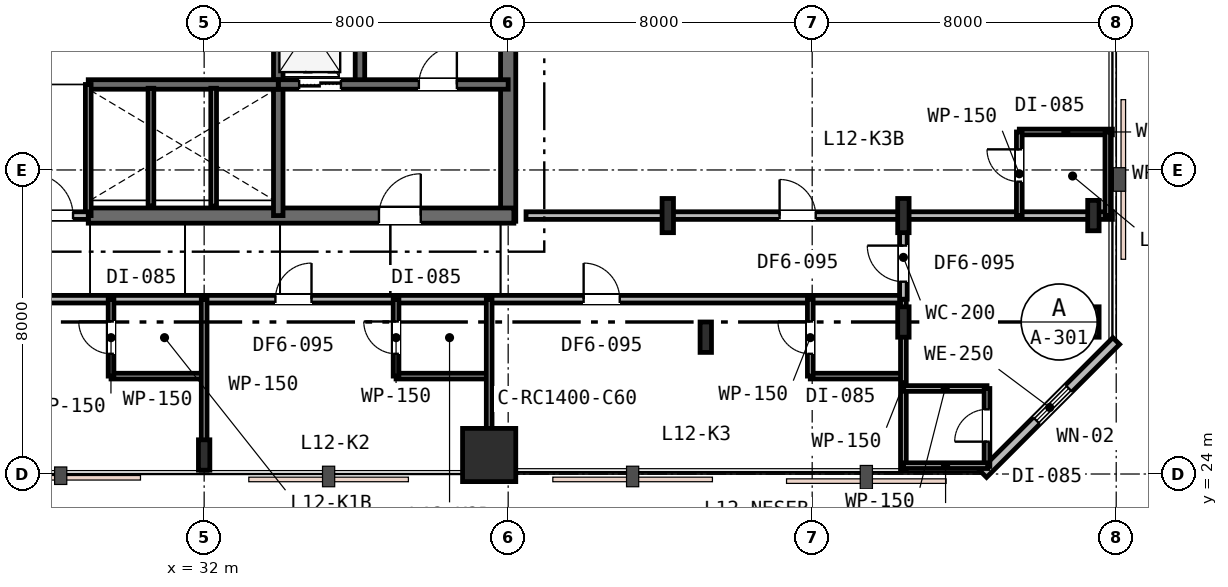
"""IFC4 building model, lengths in metres.
Left out: names, types, materials, properties, quantities, classifications, styles, units other than length and angle.
Written with IfcOpenShell. Run it as: python <this file> out.ifc"""

import sys

from ifc_helpers import new_model, si_unit, direction, frame, frame_2d, origin, origin_2d, place, context, subcontext, project, spatial, rectangle, i_section, extrude, element, fill, save


model = new_model("IFC4")
c1 = context("Model", 3, precision=1e-05, world=origin(), true_north=direction((0.0, 1.0)))
c2 = subcontext(c1, "Body", "Model", "MODEL_VIEW")
j1 = project(units=[si_unit("LENGTHUNIT", "METRE"), si_unit("PLANEANGLEUNIT", "RADIAN")], contexts=[c1])
p1 = place(None, origin())
s1 = spatial("IfcSite", under=j1, at=p1, CompositionType="ELEMENT")
p2 = place(p1, origin())
s2 = spatial("IfcBuilding", under=s1, at=p2, CompositionType="ELEMENT")
p3 = place(p2, frame((0.0, 0.0, 51.0)))
s3 = spatial("IfcBuildingStorey", under=s2, at=p3, CompositionType="ELEMENT", Elevation=51.0)
p4 = place(p3, frame((40.0, 30.65, 0.0), z_axis=(0.0, 0.0, 1.0), x_axis=(0.0, 1.0, 0.0)))
e1 = element("IfcWall", 1, at=p4, inside=s3, PredefinedType="SHEAR", context=c2, shape_type="SweptSolid", body=[
    extrude(rectangle(XDim=12.3, YDim=0.4, at=frame_2d((6.15, 0.0))), origin(), (0.0, 0.0, 1.0), 3.6),
])
p5 = place(p3, frame((28.95, 30.8, 0.0), z_axis=(0.0, 0.0, 1.0), x_axis=(1.0, 0.0, 0.0)))
e2 = element("IfcWall", 2, at=p5, inside=s3, PredefinedType="SHEAR", context=c2, shape_type="SweptSolid", body=[
    extrude(rectangle(XDim=11.2, YDim=0.4, at=frame_2d((5.6, 0.0))), origin(), (0.0, 0.0, 1.0), 3.6),
])
p6 = place(p5, frame((7.65, 0.0, 0.0)))
e3 = element("IfcOpeningElement", 3, at=p6, cuts=e2, PredefinedType="OPENING", context=c2, shape_type="SweptSolid", body=[
    extrude(rectangle(XDim=1.1, YDim=2.15, at=frame_2d((0.55, 1.075))), frame((0.0, 0.21, 0.0), z_axis=(0.0, -1.0, 0.0), x_axis=(1.0, 0.0, 0.0)), (0.0, 0.0, 1.0), 0.42),
])
p7 = place(p3, frame((36.1, 34.25, 0.0), z_axis=(0.0, 0.0, 1.0), x_axis=(0.0, 1.0, 0.0)))
e4 = element("IfcWall", 4, at=p7, inside=s3, PredefinedType="SHEAR", context=c2, shape_type="SweptSolid", body=[
    extrude(rectangle(XDim=8.65, YDim=0.25, at=frame_2d((4.325, 0.0))), origin(), (0.0, 0.0, 1.0), 3.6),
])
p8 = place(p3, frame((33.95, 30.8, 0.0), z_axis=(0.0, 0.0, 1.0), x_axis=(0.0, 1.0, 0.0)))
e5 = element("IfcWall", 5, at=p8, inside=s3, PredefinedType="SHEAR", context=c2, shape_type="SweptSolid", body=[
    extrude(rectangle(XDim=6.45, YDim=0.25, at=frame_2d((3.225, 0.0))), origin(), (0.0, 0.0, 1.0), 3.6),
])
p9 = place(p3, frame((33.95, 34.25, 0.0), z_axis=(0.0, 0.0, 1.0), x_axis=(1.0, 0.0, 0.0)))
e6 = element("IfcWall", 6, at=p9, inside=s3, PredefinedType="SHEAR", context=c2, shape_type="SweptSolid", body=[
    extrude(rectangle(XDim=6.05, YDim=0.25, at=frame_2d((3.025, 0.0))), origin(), (0.0, 0.0, 1.0), 3.6),
])
p10 = place(p9, frame((3.7, 0.0, 0.0)))
e7 = element("IfcOpeningElement", 7, at=p10, cuts=e6, PredefinedType="OPENING", context=c2, shape_type="SweptSolid", body=[
    extrude(rectangle(XDim=1.0, YDim=2.15, at=frame_2d((0.5, 1.075))), frame((0.0, 0.135, 0.0), z_axis=(0.0, -1.0, 0.0), x_axis=(1.0, 0.0, 0.0)), (0.0, 0.0, 1.0), 0.27),
])
p11 = place(p9, frame((0.55, 0.0, 0.0)))
e8 = element("IfcOpeningElement", 8, at=p11, cuts=e6, PredefinedType="OPENING", context=c2, shape_type="SweptSolid", body=[
    extrude(rectangle(XDim=1.1, YDim=2.15, at=frame_2d((0.55, 1.075))), frame((0.0, 0.135, 0.0), z_axis=(0.0, -1.0, 0.0), x_axis=(1.0, 0.0, 0.0)), (0.0, 0.0, 1.0), 0.27),
])
p12 = place(p3, frame((28.95, 34.25, 0.0), z_axis=(0.0, 0.0, 1.0), x_axis=(1.0, 0.0, 0.0)))
e9 = element("IfcWall", 9, at=p12, inside=s3, PredefinedType="SHEAR", context=c2, shape_type="SweptSolid", body=[
    extrude(rectangle(XDim=5.0, YDim=0.25, at=frame_2d((2.5, 0.0))), origin(), (0.0, 0.0, 1.0), 3.6),
])
p13 = place(p3, frame((32.0, 24.5, 0.0), z_axis=(0.0, 0.0, 1.0), x_axis=(1.0, 0.0, 0.0)))
e10 = element("IfcColumn", 10, at=p13, inside=s3, PredefinedType="COLUMN", context=c2, shape_type="SweptSolid", body=[
    extrude(i_section(OverallWidth=0.3, OverallDepth=0.8, WebThickness=0.018, FlangeThickness=0.033, FilletRadius=0.03, at=origin_2d()), origin(), (0.0, 0.0, 1.0), 3.6),
])
p14 = place(p3, frame((39.5, 24.5, 0.0), z_axis=(0.0, 0.0, 1.0), x_axis=(1.0, 0.0, 0.0)))
e11 = element("IfcColumn", 11, at=p14, inside=s3, PredefinedType="COLUMN", context=c2, shape_type="SweptSolid", body=[
    extrude(rectangle(XDim=1.4, YDim=1.4, at=origin_2d()), origin(), (0.0, 0.0, 1.0), 3.6),
])
for number, where, z_axis, x_axis in (
    (12, (45.2, 27.6, 0.0), (0.0, 0.0, 1.0), (1.0, 0.0, 0.0)),
    (13, (50.4, 28.0, 0.0), (0.0, 0.0, 1.0), (1.0, 0.0, 0.0)),
    (14, (55.4, 28.0, 0.0), (0.0, 0.0, 1.0), (1.0, 0.0, 0.0)),
    (15, (55.4, 30.8, 0.0), (0.0, 0.0, 1.0), (1.0, 0.0, 0.0)),
):
    element("IfcColumn", number, at=place(p3, frame(where, z_axis=z_axis, x_axis=x_axis)), inside=s3, PredefinedType="COLUMN", context=c2, shape_type="SweptSolid", body=[
        extrude(i_section(OverallWidth=0.3, OverallDepth=0.8, WebThickness=0.018, FlangeThickness=0.033, FilletRadius=0.03, at=origin_2d()), origin(), (0.0, 0.0, 1.0), 3.6),
    ])
for number, where, z_axis, x_axis in (
    (16, (44.2, 30.8, 0.0), (0.0, 0.0, 1.0), (1.0, 0.0, 0.0)),
    (17, (50.4, 30.8, 0.0), (0.0, 0.0, 1.0), (1.0, 0.0, 0.0)),
):
    element("IfcColumn", number, at=place(p3, frame(where, z_axis=z_axis, x_axis=x_axis)), inside=s3, PredefinedType="COLUMN", context=c2, shape_type="SweptSolid", body=[
        extrude(i_section(OverallWidth=0.3, OverallDepth=0.9, WebThickness=0.018, FlangeThickness=0.035, FilletRadius=0.03, at=origin_2d()), origin(), (0.0, 0.0, 1.0), 3.6),
    ])
p15 = place(p3, frame((52.5, 24.0, 0.0), z_axis=(0.0, 0.0, 1.0), x_axis=(0.707106781187, 0.707106781187, 0.0)))
e18 = element("IfcWall", 18, at=p15, inside=s3, PredefinedType="STANDARD", context=c2, shape_type="SweptSolid", body=[
    extrude(rectangle(XDim=4.95, YDim=0.25, at=frame_2d((2.475, 0.0))), origin(), (0.0, 0.0, 1.0), 3.33),
])
p16 = place(p15, frame((1.985, 0.0, 0.85)))
e19 = element("IfcOpeningElement", 19, at=p16, cuts=e18, PredefinedType="OPENING", context=c2, shape_type="SweptSolid", body=[
    extrude(rectangle(XDim=1.2, YDim=1.6, at=frame_2d((0.6, 0.8))), frame((0.0, 0.135, 0.0), z_axis=(0.0, -1.0, 0.0), x_axis=(1.0, 0.0, 0.0)), (0.0, 0.0, 1.0), 0.27),
])
p17 = place(p3, frame((28.95, 30.8, 0.0), z_axis=(0.0, 0.0, 1.0), x_axis=(0.0, 1.0, 0.0)))
e20 = element("IfcWall", 20, at=p17, inside=s3, PredefinedType="PLUMBINGWALL", context=c2, shape_type="SweptSolid", body=[
    extrude(rectangle(XDim=3.45, YDim=0.15, at=frame_2d((1.725, 0.0))), origin(), (0.0, 0.0, 1.0), 3.33),
])
p18 = place(p3, frame((27.05, 30.8, 0.0), z_axis=(0.0, 0.0, 1.0), x_axis=(1.0, 0.0, 0.0)))
e21 = element("IfcWall", 21, at=p18, inside=s3, PredefinedType="PARTITIONING", context=c2, shape_type="SweptSolid", body=[
    extrude(rectangle(XDim=1.9, YDim=0.2, at=frame_2d((0.95, 0.0))), origin(), (0.0, 0.0, 1.0), 3.33),
])
p19 = place(p18, frame((0.4, 0.0, 0.0)))
e22 = element("IfcOpeningElement", 22, at=p19, cuts=e21, PredefinedType="OPENING", context=c2, shape_type="SweptSolid", body=[
    extrude(rectangle(XDim=1.1, YDim=2.15, at=frame_2d((0.55, 1.075))), frame((0.0, 0.11, 0.0), z_axis=(0.0, -1.0, 0.0), x_axis=(1.0, 0.0, 0.0)), (0.0, 0.0, 1.0), 0.22),
])
for number, where, z_axis, x_axis in (
    (23, (30.6, 31.05, 0.0), (0.0, 0.0, 1.0), (0.0, 1.0, 0.0)),
    (24, (32.25, 31.05, 0.0), (0.0, 0.0, 1.0), (0.0, 1.0, 0.0)),
):
    element("IfcWall", number, at=place(p3, frame(where, z_axis=z_axis, x_axis=x_axis)), inside=s3, PredefinedType="PLUMBINGWALL", context=c2, shape_type="SweptSolid", body=[
        extrude(rectangle(XDim=3.1, YDim=0.15, at=frame_2d((1.55, 0.0))), origin(), (0.0, 0.0, 1.0), 3.33),
    ])
p20 = place(p3, frame((21.8, 28.6, 0.0), z_axis=(0.0, 0.0, 1.0), x_axis=(1.0, 0.0, 0.0)))
e25 = element("IfcWall", 25, at=p20, inside=s3, PredefinedType="PARTITIONING", context=c2, shape_type="SweptSolid", body=[
    extrude(rectangle(XDim=28.6, YDim=0.2, at=frame_2d((14.3, 0.0))), origin(), (0.0, 0.0, 1.0), 2.82),
])
p21 = place(p20, frame((4.3, 0.0, 0.0)))
e26 = element("IfcOpeningElement", 26, at=p21, cuts=e25, PredefinedType="OPENING", context=c2, shape_type="SweptSolid", body=[
    extrude(rectangle(XDim=0.95, YDim=2.15, at=frame_2d((0.475, 1.075))), frame((0.0, 0.11, 0.0), z_axis=(0.0, -1.0, 0.0), x_axis=(1.0, 0.0, 0.0)), (0.0, 0.0, 1.0), 0.22),
])
p22 = place(p20, frame((12.075, 0.0, 0.0)))
e27 = element("IfcOpeningElement", 27, at=p22, cuts=e25, PredefinedType="OPENING", context=c2, shape_type="SweptSolid", body=[
    extrude(rectangle(XDim=0.95, YDim=2.15, at=frame_2d((0.475, 1.075))), frame((0.0, 0.11, 0.0), z_axis=(0.0, -1.0, 0.0), x_axis=(1.0, 0.0, 0.0)), (0.0, 0.0, 1.0), 0.22),
])
p23 = place(p20, frame((20.186, 0.0, 0.0)))
e28 = element("IfcOpeningElement", 28, at=p23, cuts=e25, PredefinedType="OPENING", context=c2, shape_type="SweptSolid", body=[
    extrude(rectangle(XDim=0.95, YDim=2.15, at=frame_2d((0.475, 1.075))), frame((0.0, 0.11, 0.0), z_axis=(0.0, -1.0, 0.0), x_axis=(1.0, 0.0, 0.0)), (0.0, 0.0, 1.0), 0.22),
])
p24 = place(p3, frame((29.55, 26.576, 0.0), z_axis=(0.0, 0.0, 1.0), x_axis=(1.0, 0.0, 0.0)))
e29 = element("IfcWall", 29, at=p24, inside=s3, PredefinedType="PARTITIONING", context=c2, shape_type="SweptSolid", body=[
    extrude(rectangle(XDim=2.45, YDim=0.15, at=frame_2d((1.225, 0.0))), origin(), (0.0, 0.0, 1.0), 3.33),
])
p25 = place(p3, frame((29.55, 26.576, 0.0), z_axis=(0.0, 0.0, 1.0), x_axis=(0.0, 1.0, 0.0)))
e30 = element("IfcWall", 30, at=p25, inside=s3, PredefinedType="PARTITIONING", context=c2, shape_type="SweptSolid", body=[
    extrude(rectangle(XDim=2.024, YDim=0.15, at=frame_2d((1.012, 0.0))), origin(), (0.0, 0.0, 1.0), 3.33),
])
p26 = place(p25, frame((0.587, 0.0, 0.0)))
e31 = element("IfcOpeningElement", 31, at=p26, cuts=e30, PredefinedType="OPENING", context=c2, shape_type="SweptSolid", body=[
    extrude(rectangle(XDim=0.85, YDim=2.15, at=frame_2d((0.425, 1.075))), frame((0.0, 0.085, 0.0), z_axis=(0.0, -1.0, 0.0), x_axis=(1.0, 0.0, 0.0)), (0.0, 0.0, 1.0), 0.17),
])
p27 = place(p3, frame((32.0, 28.6, 0.0), z_axis=(0.0, 0.0, 1.0), x_axis=(0.0, -1.0, 0.0)))
e32 = element("IfcWall", 32, at=p27, inside=s3, PredefinedType="PARTITIONING", context=c2, shape_type="SweptSolid", body=[
    extrude(rectangle(XDim=4.5, YDim=0.15, at=frame_2d((2.25, 0.0))), origin(), (0.0, 0.0, 1.0), 2.93),
])
p28 = place(p3, frame((37.05, 26.576, 0.0), z_axis=(0.0, 0.0, 1.0), x_axis=(1.0, 0.0, 0.0)))
e33 = element("IfcWall", 33, at=p28, inside=s3, PredefinedType="PARTITIONING", context=c2, shape_type="SweptSolid", body=[
    extrude(rectangle(XDim=2.45, YDim=0.15, at=frame_2d((1.225, 0.0))), origin(), (0.0, 0.0, 1.0), 2.82),
])
p29 = place(p3, frame((37.05, 26.576, 0.0), z_axis=(0.0, 0.0, 1.0), x_axis=(0.0, 1.0, 0.0)))
e34 = element("IfcWall", 34, at=p29, inside=s3, PredefinedType="PARTITIONING", context=c2, shape_type="SweptSolid", body=[
    extrude(rectangle(XDim=2.024, YDim=0.15, at=frame_2d((1.012, 0.0))), origin(), (0.0, 0.0, 1.0), 2.96),
])
p30 = place(p29, frame((0.587, 0.0, 0.0)))
e35 = element("IfcOpeningElement", 35, at=p30, cuts=e34, PredefinedType="OPENING", context=c2, shape_type="SweptSolid", body=[
    extrude(rectangle(XDim=0.85, YDim=2.15, at=frame_2d((0.425, 1.075))), frame((0.0, 0.085, 0.0), z_axis=(0.0, -1.0, 0.0), x_axis=(1.0, 0.0, 0.0)), (0.0, 0.0, 1.0), 0.17),
])
p31 = place(p3, frame((39.5, 28.6, 0.0), z_axis=(0.0, 0.0, 1.0), x_axis=(0.0, -1.0, 0.0)))
e36 = element("IfcWall", 36, at=p31, inside=s3, PredefinedType="PARTITIONING", context=c2, shape_type="SweptSolid", body=[
    extrude(rectangle(XDim=4.5, YDim=0.15, at=frame_2d((2.25, 0.0))), origin(), (0.0, 0.0, 1.0), 2.82),
])
p32 = place(p3, frame((47.95, 26.576, 0.0), z_axis=(0.0, 0.0, 1.0), x_axis=(1.0, 0.0, 0.0)))
e37 = element("IfcWall", 37, at=p32, inside=s3, PredefinedType="PARTITIONING", context=c2, shape_type="SweptSolid", body=[
    extrude(rectangle(XDim=2.45, YDim=0.15, at=frame_2d((1.225, 0.0))), origin(), (0.0, 0.0, 1.0), 3.33),
])
p33 = place(p3, frame((47.95, 26.576, 0.0), z_axis=(0.0, 0.0, 1.0), x_axis=(0.0, 1.0, 0.0)))
e38 = element("IfcWall", 38, at=p33, inside=s3, PredefinedType="PARTITIONING", context=c2, shape_type="SweptSolid", body=[
    extrude(rectangle(XDim=2.024, YDim=0.15, at=frame_2d((1.012, 0.0))), origin(), (0.0, 0.0, 1.0), 3.33),
])
p34 = place(p33, frame((0.587, 0.0, 0.0)))
e39 = element("IfcOpeningElement", 39, at=p34, cuts=e38, PredefinedType="OPENING", context=c2, shape_type="SweptSolid", body=[
    extrude(rectangle(XDim=0.85, YDim=2.15, at=frame_2d((0.425, 1.075))), frame((0.0, 0.085, 0.0), z_axis=(0.0, -1.0, 0.0), x_axis=(1.0, 0.0, 0.0)), (0.0, 0.0, 1.0), 0.17),
])
p35 = place(p3, frame((50.4, 28.6, 0.0), z_axis=(0.0, 0.0, 1.0), x_axis=(0.0, -1.0, 0.0)))
e40 = element("IfcWall", 40, at=p35, inside=s3, PredefinedType="PARTITIONING", context=c2, shape_type="SweptSolid", body=[
    extrude(rectangle(XDim=4.5, YDim=0.15, at=frame_2d((2.25, 0.0))), origin(), (0.0, 0.0, 1.0), 2.82),
])
p36 = place(p3, frame((40.47, 30.8, 0.0), z_axis=(0.0, 0.0, 1.0), x_axis=(1.0, 0.0, 0.0)))
e41 = element("IfcWall", 41, at=p36, inside=s3, PredefinedType="PARTITIONING", context=c2, shape_type="SweptSolid", body=[
    extrude(rectangle(XDim=15.43, YDim=0.2, at=frame_2d((7.715, 0.0))), origin(), (0.0, 0.0, 1.0), 2.82),
])
p37 = place(p36, frame((6.673, 0.0, 0.0)))
e42 = element("IfcOpeningElement", 42, at=p37, cuts=e41, PredefinedType="OPENING", context=c2, shape_type="SweptSolid", body=[
    extrude(rectangle(XDim=0.95, YDim=2.15, at=frame_2d((0.475, 1.075))), frame((0.0, 0.11, 0.0), z_axis=(0.0, -1.0, 0.0), x_axis=(1.0, 0.0, 0.0)), (0.0, 0.0, 1.0), 0.22),
])
p38 = place(p3, frame((53.45, 33.0, 0.0), z_axis=(0.0, 0.0, 1.0), x_axis=(1.0, 0.0, 0.0)))
e43 = element("IfcWall", 43, at=p38, inside=s3, PredefinedType="PARTITIONING", context=c2, shape_type="SweptSolid", body=[
    extrude(rectangle(XDim=2.45, YDim=0.15, at=frame_2d((1.225, 0.0))), origin(), (0.0, 0.0, 1.0), 2.93),
])
p39 = place(p3, frame((53.45, 30.8, 0.0), z_axis=(0.0, 0.0, 1.0), x_axis=(0.0, 1.0, 0.0)))
e44 = element("IfcWall", 44, at=p39, inside=s3, PredefinedType="PARTITIONING", context=c2, shape_type="SweptSolid", body=[
    extrude(rectangle(XDim=2.2, YDim=0.15, at=frame_2d((1.1, 0.0))), origin(), (0.0, 0.0, 1.0), 2.82),
])
p40 = place(p39, frame((0.892, 0.0, 0.0)))
e45 = element("IfcOpeningElement", 45, at=p40, cuts=e44, PredefinedType="OPENING", context=c2, shape_type="SweptSolid", body=[
    extrude(rectangle(XDim=0.85, YDim=2.15, at=frame_2d((0.425, 1.075))), frame((0.0, 0.085, 0.0), z_axis=(0.0, -1.0, 0.0), x_axis=(1.0, 0.0, 0.0)), (0.0, 0.0, 1.0), 0.17),
])
p41 = place(p3, frame((55.78, 33.0, 0.0), z_axis=(0.0, 0.0, 1.0), x_axis=(0.0, -1.0, 0.0)))
e46 = element("IfcWall", 46, at=p41, inside=s3, PredefinedType="PARTITIONING", context=c2, shape_type="SweptSolid", body=[
    extrude(rectangle(XDim=2.2, YDim=0.15, at=frame_2d((1.1, 0.0))), origin(), (0.0, 0.0, 1.0), 2.82),
])
p42 = place(p3, frame((50.4, 28.6, 0.0), z_axis=(0.0, 0.0, 1.0), x_axis=(0.0, 1.0, 0.0)))
e47 = element("IfcWall", 47, at=p42, inside=s3, PredefinedType="PARTITIONING", context=c2, shape_type="SweptSolid", body=[
    extrude(rectangle(XDim=2.2, YDim=0.2, at=frame_2d((1.1, 0.0))), origin(), (0.0, 0.0, 1.0), 2.82),
])
p43 = place(p42, frame((0.46, 0.0, 0.0)))
e48 = element("IfcOpeningElement", 48, at=p43, cuts=e47, PredefinedType="OPENING", context=c2, shape_type="SweptSolid", body=[
    extrude(rectangle(XDim=0.95, YDim=2.15, at=frame_2d((0.475, 1.075))), frame((0.0, 0.11, 0.0), z_axis=(0.0, -1.0, 0.0), x_axis=(1.0, 0.0, 0.0)), (0.0, 0.0, 1.0), 0.22),
])
p44 = place(p3, frame((50.4, 26.25, 0.0), z_axis=(0.0, 0.0, 1.0), x_axis=(1.0, 0.0, 0.0)))
e49 = element("IfcWall", 49, at=p44, inside=s3, PredefinedType="PARTITIONING", context=c2, shape_type="SweptSolid", body=[
    extrude(rectangle(XDim=2.2, YDim=0.15, at=frame_2d((1.1, 0.0))), origin(), (0.0, 0.0, 1.0), 3.33),
])
p45 = place(p3, frame((52.6, 24.2, 0.0), z_axis=(0.0, 0.0, 1.0), x_axis=(0.0, 1.0, 0.0)))
e50 = element("IfcWall", 50, at=p45, inside=s3, PredefinedType="PARTITIONING", context=c2, shape_type="SweptSolid", body=[
    extrude(rectangle(XDim=2.05, YDim=0.15, at=frame_2d((1.025, 0.0))), origin(), (0.0, 0.0, 1.0), 3.33),
])
p46 = place(p45, frame((0.651, 0.0, 0.0)))
e51 = element("IfcOpeningElement", 51, at=p46, cuts=e50, PredefinedType="OPENING", context=c2, shape_type="SweptSolid", body=[
    extrude(rectangle(XDim=0.85, YDim=2.15, at=frame_2d((0.425, 1.075))), frame((0.0, 0.085, 0.0), z_axis=(0.0, -1.0, 0.0), x_axis=(1.0, 0.0, 0.0)), (0.0, 0.0, 1.0), 0.17),
])
p47 = place(p3, frame((52.62, 24.22, 0.0), z_axis=(0.0, 0.0, 1.0), x_axis=(-1.0, 0.0, 0.0)))
e52 = element("IfcWall", 52, at=p47, inside=s3, PredefinedType="PARTITIONING", context=c2, shape_type="SweptSolid", body=[
    extrude(rectangle(XDim=2.22, YDim=0.15, at=frame_2d((1.11, 0.0))), origin(), (0.0, 0.0, 1.0), 3.33),
])
p48 = place(p16, origin())
e53 = element("IfcWindow", 53, at=p48, inside=s3, PartitioningType="SINGLE_PANEL", PredefinedType="WINDOW", context=c2, shape_type="SweptSolid", body=[
    extrude(rectangle(XDim=1.2, YDim=1.6, at=frame_2d((0.6, 0.8))), frame((0.0, 0.03, 0.0), z_axis=(0.0, -1.0, 0.0), x_axis=(1.0, 0.0, 0.0)), (0.0, 0.0, 1.0), 0.06),
])
fill(e19, e53)
p49 = place(p19, origin())
e54 = element("IfcDoor", 54, at=p49, inside=s3, OperationType="SINGLE_SWING_LEFT", PredefinedType="DOOR", context=c2, shape_type="SweptSolid", body=[
    extrude(rectangle(XDim=1.1, YDim=2.15, at=frame_2d((0.55, 1.075))), frame((0.0, 0.025, 0.0), z_axis=(0.0, -1.0, 0.0), x_axis=(1.0, 0.0, 0.0)), (0.0, 0.0, 1.0), 0.05),
])
fill(e22, e54)
p50 = place(p10, origin())
e55 = element("IfcDoor", 55, at=p50, inside=s3, OperationType="SINGLE_SWING_RIGHT", PredefinedType="DOOR", context=c2, shape_type="SweptSolid", body=[
    extrude(rectangle(XDim=1.0, YDim=2.15, at=frame_2d((0.5, 1.075))), frame((0.0, 0.025, 0.0), z_axis=(0.0, -1.0, 0.0), x_axis=(1.0, 0.0, 0.0)), (0.0, 0.0, 1.0), 0.05),
])
fill(e7, e55)
p51 = place(p6, origin())
e56 = element("IfcDoor", 56, at=p51, inside=s3, OperationType="SINGLE_SWING_RIGHT", PredefinedType="DOOR", context=c2, shape_type="SweptSolid", body=[
    extrude(rectangle(XDim=1.1, YDim=2.15, at=frame_2d((0.55, 1.075))), frame((0.0, 0.025, 0.0), z_axis=(0.0, -1.0, 0.0), x_axis=(1.0, 0.0, 0.0)), (0.0, 0.0, 1.0), 0.05),
])
fill(e3, e56)
p52 = place(p26, origin())
e57 = element("IfcDoor", 57, at=p52, inside=s3, OperationType="SINGLE_SWING_RIGHT", PredefinedType="DOOR", context=c2, shape_type="SweptSolid", body=[
    extrude(rectangle(XDim=0.85, YDim=2.15, at=frame_2d((0.425, 1.075))), frame((0.0, 0.025, 0.0), z_axis=(0.0, -1.0, 0.0), x_axis=(1.0, 0.0, 0.0)), (0.0, 0.0, 1.0), 0.05),
])
fill(e31, e57)
p53 = place(p22, origin())
e58 = element("IfcDoor", 58, at=p53, inside=s3, OperationType="SINGLE_SWING_RIGHT", PredefinedType="DOOR", context=c2, shape_type="SweptSolid", body=[
    extrude(rectangle(XDim=0.95, YDim=2.15, at=frame_2d((0.475, 1.075))), frame((0.0, 0.025, 0.0), z_axis=(0.0, -1.0, 0.0), x_axis=(1.0, 0.0, 0.0)), (0.0, 0.0, 1.0), 0.05),
])
fill(e27, e58)
p54 = place(p30, origin())
e59 = element("IfcDoor", 59, at=p54, inside=s3, OperationType="SINGLE_SWING_RIGHT", PredefinedType="DOOR", context=c2, shape_type="SweptSolid", body=[
    extrude(rectangle(XDim=0.85, YDim=2.15, at=frame_2d((0.425, 1.075))), frame((0.0, 0.025, 0.0), z_axis=(0.0, -1.0, 0.0), x_axis=(1.0, 0.0, 0.0)), (0.0, 0.0, 1.0), 0.05),
])
fill(e35, e59)
p55 = place(p23, origin())
e60 = element("IfcDoor", 60, at=p55, inside=s3, OperationType="SINGLE_SWING_LEFT", PredefinedType="DOOR", context=c2, shape_type="SweptSolid", body=[
    extrude(rectangle(XDim=0.95, YDim=2.15, at=frame_2d((0.475, 1.075))), frame((0.0, 0.025, 0.0), z_axis=(0.0, -1.0, 0.0), x_axis=(1.0, 0.0, 0.0)), (0.0, 0.0, 1.0), 0.05),
])
fill(e28, e60)
p56 = place(p34, origin())
e61 = element("IfcDoor", 61, at=p56, inside=s3, OperationType="SINGLE_SWING_RIGHT", PredefinedType="DOOR", context=c2, shape_type="SweptSolid", body=[
    extrude(rectangle(XDim=0.85, YDim=2.15, at=frame_2d((0.425, 1.075))), frame((0.0, 0.025, 0.0), z_axis=(0.0, -1.0, 0.0), x_axis=(1.0, 0.0, 0.0)), (0.0, 0.0, 1.0), 0.05),
])
fill(e39, e61)
p57 = place(p37, origin())
e62 = element("IfcDoor", 62, at=p57, inside=s3, OperationType="SINGLE_SWING_LEFT", PredefinedType="DOOR", context=c2, shape_type="SweptSolid", body=[
    extrude(rectangle(XDim=0.95, YDim=2.15, at=frame_2d((0.475, 1.075))), frame((0.0, 0.025, 0.0), z_axis=(0.0, -1.0, 0.0), x_axis=(1.0, 0.0, 0.0)), (0.0, 0.0, 1.0), 0.05),
])
fill(e42, e62)
p58 = place(p40, origin())
e63 = element("IfcDoor", 63, at=p58, inside=s3, OperationType="SINGLE_SWING_RIGHT", PredefinedType="DOOR", context=c2, shape_type="SweptSolid", body=[
    extrude(rectangle(XDim=0.85, YDim=2.15, at=frame_2d((0.425, 1.075))), frame((0.0, 0.025, 0.0), z_axis=(0.0, -1.0, 0.0), x_axis=(1.0, 0.0, 0.0)), (0.0, 0.0, 1.0), 0.05),
])
fill(e45, e63)
p59 = place(p43, origin())
e64 = element("IfcDoor", 64, at=p59, inside=s3, OperationType="SINGLE_SWING_RIGHT", PredefinedType="DOOR", context=c2, shape_type="SweptSolid", body=[
    extrude(rectangle(XDim=0.95, YDim=2.15, at=frame_2d((0.475, 1.075))), frame((0.0, 0.025, 0.0), z_axis=(0.0, -1.0, 0.0), x_axis=(1.0, 0.0, 0.0)), (0.0, 0.0, 1.0), 0.05),
])
fill(e48, e64)
p60 = place(p46, origin())
e65 = element("IfcDoor", 65, at=p60, inside=s3, OperationType="SINGLE_SWING_LEFT", PredefinedType="DOOR", context=c2, shape_type="SweptSolid", body=[
    extrude(rectangle(XDim=0.85, YDim=2.15, at=frame_2d((0.425, 1.075))), frame((0.0, 0.025, 0.0), z_axis=(0.0, -1.0, 0.0), x_axis=(1.0, 0.0, 0.0)), (0.0, 0.0, 1.0), 0.05),
])
fill(e51, e65)
p61 = place(p11, origin())
e66 = element("IfcDoor", 66, at=p61, inside=s3, OperationType="DOUBLE_DOOR_SLIDING", PredefinedType="DOOR", context=c2, shape_type="SweptSolid", body=[
    extrude(rectangle(XDim=1.1, YDim=2.15, at=frame_2d((0.55, 1.075))), frame((0.0, 0.025, 0.0), z_axis=(0.0, -1.0, 0.0), x_axis=(1.0, 0.0, 0.0)), (0.0, 0.0, 1.0), 0.05),
])
fill(e8, e66)
save(model, sys.argv[1])
